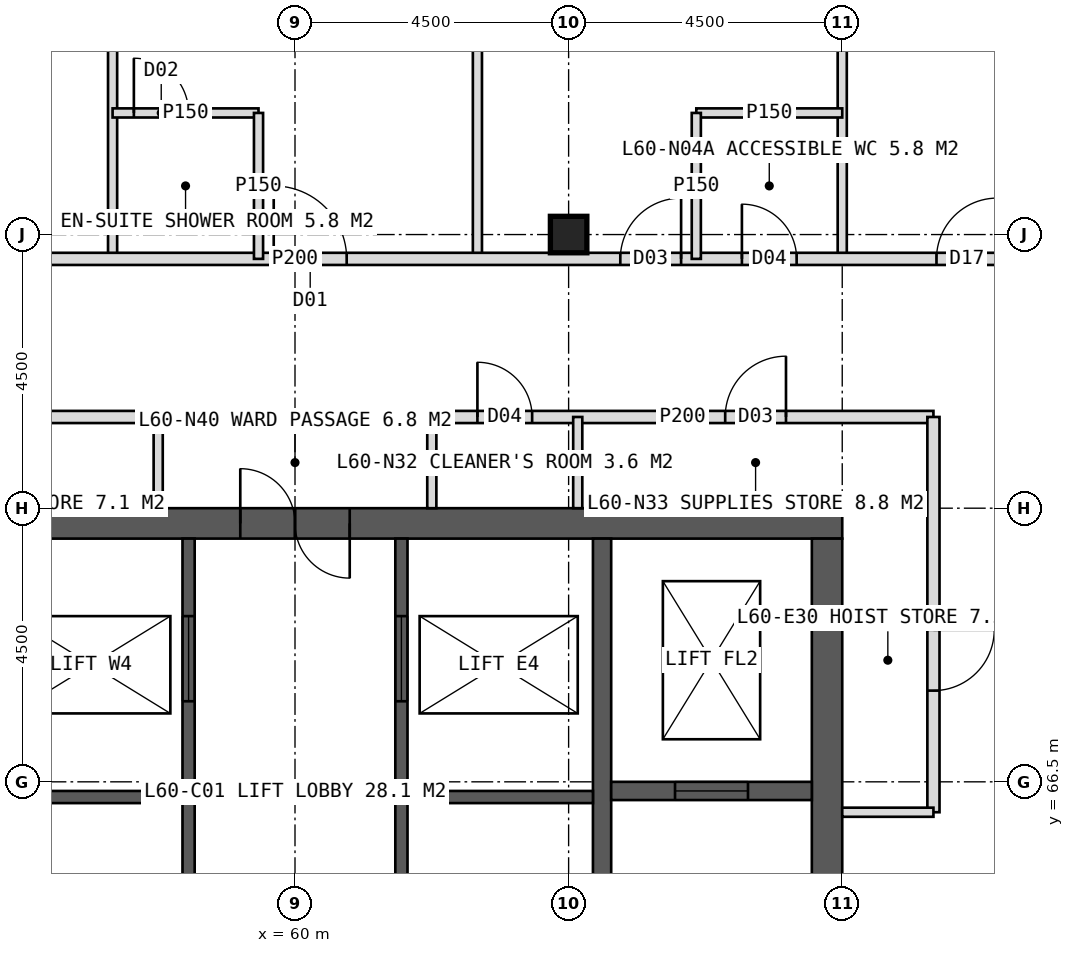
"""IFC4 building model, lengths in metres.
Left out: names, types, materials, properties, quantities, classifications, styles, units other than length and angle.
Written with IfcOpenShell. Run it as: python <this file> out.ifc"""

import sys

from ifc_helpers import new_model, si_unit, direction, frame, frame_2d, origin, origin_2d, place, context, subcontext, project, spatial, rectangle, hollow_rectangle, extrude, element, fill, save


model = new_model("IFC4")
c1 = context("Model", 3, precision=1e-05, world=origin(), true_north=direction((0.0, 1.0)))
c2 = subcontext(c1, "Body", "Model", "MODEL_VIEW")
j1 = project(units=[si_unit("LENGTHUNIT", "METRE"), si_unit("PLANEANGLEUNIT", "RADIAN")], contexts=[c1])
p1 = place(None, origin())
s1 = spatial("IfcSite", under=j1, at=p1, CompositionType="ELEMENT")
p2 = place(p1, origin())
s2 = spatial("IfcBuilding", under=s1, at=p2, CompositionType="ELEMENT")
p3 = place(p2, frame((0.0, 0.0, 250.0)))
s3 = spatial("IfcBuildingStorey", under=s2, at=p3, CompositionType="ELEMENT", Elevation=250.0)
p4 = place(p3, frame((51.0, 70.75, 0.0), z_axis=(0.0, 0.0, 1.0), x_axis=(1.0, 0.0, 0.0)))
e1 = element("IfcWall", 1, at=p4, inside=s3, PredefinedType="SHEAR", context=c2, shape_type="SweptSolid", body=[
    extrude(rectangle(XDim=18.0, YDim=0.5, at=frame_2d((9.0, 0.0))), origin(), (0.0, 0.0, 1.0), 4.0),
])
p5 = place(p4, frame((8.1, 0.0, 0.0)))
e2 = element("IfcOpeningElement", 2, at=p5, cuts=e1, PredefinedType="OPENING", context=c2, shape_type="SweptSolid", body=[
    extrude(rectangle(XDim=1.8, YDim=2.2, at=frame_2d((0.9, 1.1))), frame((0.0, 0.26, 0.0), z_axis=(0.0, -1.0, 0.0), x_axis=(1.0, 0.0, 0.0)), (0.0, 0.0, 1.0), 0.52),
])
p6 = place(p3, frame((68.75, 53.5, 0.0), z_axis=(0.0, 0.0, 1.0), x_axis=(0.0, 1.0, 0.0)))
e3 = element("IfcWall", 3, at=p6, inside=s3, PredefinedType="SHEAR", context=c2, shape_type="SweptSolid", body=[
    extrude(rectangle(XDim=17.0, YDim=0.5, at=frame_2d((8.5, 0.0))), origin(), (0.0, 0.0, 1.0), 4.0),
])
p7 = place(p6, frame((9.6, 0.0, 0.0)))
e4 = element("IfcOpeningElement", 4, at=p7, cuts=e3, PredefinedType="OPENING", context=c2, shape_type="SweptSolid", body=[
    extrude(rectangle(XDim=1.5, YDim=2.2, at=frame_2d((0.75, 1.1))), frame((0.0, 0.26, 0.0), z_axis=(0.0, -1.0, 0.0), x_axis=(1.0, 0.0, 0.0)), (0.0, 0.0, 1.0), 0.52),
])
p8 = place(p3, frame((65.05, 53.5, 0.0), z_axis=(0.0, 0.0, 1.0), x_axis=(0.0, 1.0, 0.0)))
e5 = element("IfcWall", 5, at=p8, inside=s3, PredefinedType="SHEAR", context=c2, shape_type="SweptSolid", body=[
    extrude(rectangle(XDim=17.0, YDim=0.3, at=frame_2d((8.5, 0.0))), origin(), (0.0, 0.0, 1.0), 4.0),
])
p9 = place(p3, frame((58.25, 53.5, 0.0), z_axis=(0.0, 0.0, 1.0), x_axis=(0.0, 1.0, 0.0)))
e6 = element("IfcWall", 6, at=p9, inside=s3, PredefinedType="SHEAR", context=c2, shape_type="SweptSolid", body=[
    extrude(rectangle(XDim=17.0, YDim=0.2, at=frame_2d((8.5, 0.0))), origin(), (0.0, 0.0, 1.0), 4.0),
])
p10 = place(p9, frame((0.393, 0.0, 0.0)))
e7 = element("IfcOpeningElement", 7, at=p10, cuts=e6, PredefinedType="OPENING", context=c2, shape_type="SweptSolid", body=[
    extrude(rectangle(XDim=1.0, YDim=2.1, at=frame_2d((0.5, 1.05))), frame((0.0, 0.11, 0.0), z_axis=(0.0, -1.0, 0.0), x_axis=(1.0, 0.0, 0.0)), (0.0, 0.0, 1.0), 0.22),
])
p11 = place(p9, frame((2.542, 0.0, 0.0)))
e8 = element("IfcOpeningElement", 8, at=p11, cuts=e6, PredefinedType="OPENING", context=c2, shape_type="SweptSolid", body=[
    extrude(rectangle(XDim=1.0, YDim=2.1, at=frame_2d((0.5, 1.05))), frame((0.0, 0.11, 0.0), z_axis=(0.0, -1.0, 0.0), x_axis=(1.0, 0.0, 0.0)), (0.0, 0.0, 1.0), 0.22),
])
p12 = place(p9, frame((5.127, 0.0, 0.0)))
e9 = element("IfcOpeningElement", 9, at=p12, cuts=e6, PredefinedType="OPENING", context=c2, shape_type="SweptSolid", body=[
    extrude(rectangle(XDim=1.0, YDim=2.1, at=frame_2d((0.5, 1.05))), frame((0.0, 0.11, 0.0), z_axis=(0.0, -1.0, 0.0), x_axis=(1.0, 0.0, 0.0)), (0.0, 0.0, 1.0), 0.22),
])
p13 = place(p9, frame((7.228, 0.0, 0.0)))
e10 = element("IfcOpeningElement", 10, at=p13, cuts=e6, PredefinedType="OPENING", context=c2, shape_type="SweptSolid", body=[
    extrude(rectangle(XDim=1.0, YDim=2.1, at=frame_2d((0.5, 1.05))), frame((0.0, 0.11, 0.0), z_axis=(0.0, -1.0, 0.0), x_axis=(1.0, 0.0, 0.0)), (0.0, 0.0, 1.0), 0.22),
])
p14 = place(p9, frame((10.025, 0.0, 0.0)))
e11 = element("IfcOpeningElement", 11, at=p14, cuts=e6, PredefinedType="OPENING", context=c2, shape_type="SweptSolid", body=[
    extrude(rectangle(XDim=1.4, YDim=2.2, at=frame_2d((0.7, 1.1))), frame((0.0, 0.11, 0.0), z_axis=(0.0, -1.0, 0.0), x_axis=(1.0, 0.0, 0.0)), (0.0, 0.0, 1.0), 0.22),
])
p15 = place(p9, frame((14.325, 0.0, 0.0)))
e12 = element("IfcOpeningElement", 12, at=p15, cuts=e6, PredefinedType="OPENING", context=c2, shape_type="SweptSolid", body=[
    extrude(rectangle(XDim=1.4, YDim=2.2, at=frame_2d((0.7, 1.1))), frame((0.0, 0.11, 0.0), z_axis=(0.0, -1.0, 0.0), x_axis=(1.0, 0.0, 0.0)), (0.0, 0.0, 1.0), 0.22),
])
p16 = place(p3, frame((61.75, 53.5, 0.0), z_axis=(0.0, 0.0, 1.0), x_axis=(0.0, 1.0, 0.0)))
e13 = element("IfcWall", 13, at=p16, inside=s3, PredefinedType="SHEAR", context=c2, shape_type="SweptSolid", body=[
    extrude(rectangle(XDim=17.0, YDim=0.2, at=frame_2d((8.5, 0.0))), origin(), (0.0, 0.0, 1.0), 4.0),
])
p17 = place(p16, frame((0.6, 0.0, 0.0)))
e14 = element("IfcOpeningElement", 14, at=p17, cuts=e13, PredefinedType="OPENING", context=c2, shape_type="SweptSolid", body=[
    extrude(rectangle(XDim=1.0, YDim=2.1, at=frame_2d((0.5, 1.05))), frame((0.0, 0.11, 0.0), z_axis=(0.0, -1.0, 0.0), x_axis=(1.0, 0.0, 0.0)), (0.0, 0.0, 1.0), 0.22),
])
p18 = place(p16, frame((2.75, 0.0, 0.0)))
e15 = element("IfcOpeningElement", 15, at=p18, cuts=e13, PredefinedType="OPENING", context=c2, shape_type="SweptSolid", body=[
    extrude(rectangle(XDim=1.0, YDim=2.1, at=frame_2d((0.5, 1.05))), frame((0.0, 0.11, 0.0), z_axis=(0.0, -1.0, 0.0), x_axis=(1.0, 0.0, 0.0)), (0.0, 0.0, 1.0), 0.22),
])
p19 = place(p16, frame((4.824, 0.0, 0.0)))
e16 = element("IfcOpeningElement", 16, at=p19, cuts=e13, PredefinedType="OPENING", context=c2, shape_type="SweptSolid", body=[
    extrude(rectangle(XDim=1.0, YDim=2.1, at=frame_2d((0.5, 1.05))), frame((0.0, 0.11, 0.0), z_axis=(0.0, -1.0, 0.0), x_axis=(1.0, 0.0, 0.0)), (0.0, 0.0, 1.0), 0.22),
])
p20 = place(p16, frame((6.924, 0.0, 0.0)))
e17 = element("IfcOpeningElement", 17, at=p20, cuts=e13, PredefinedType="OPENING", context=c2, shape_type="SweptSolid", body=[
    extrude(rectangle(XDim=1.0, YDim=2.1, at=frame_2d((0.5, 1.05))), frame((0.0, 0.11, 0.0), z_axis=(0.0, -1.0, 0.0), x_axis=(1.0, 0.0, 0.0)), (0.0, 0.0, 1.0), 0.22),
])
p21 = place(p16, frame((10.025, 0.0, 0.0)))
e18 = element("IfcOpeningElement", 18, at=p21, cuts=e13, PredefinedType="OPENING", context=c2, shape_type="SweptSolid", body=[
    extrude(rectangle(XDim=1.4, YDim=2.2, at=frame_2d((0.7, 1.1))), frame((0.0, 0.11, 0.0), z_axis=(0.0, -1.0, 0.0), x_axis=(1.0, 0.0, 0.0)), (0.0, 0.0, 1.0), 0.22),
])
p22 = place(p16, frame((14.325, 0.0, 0.0)))
e19 = element("IfcOpeningElement", 19, at=p22, cuts=e13, PredefinedType="OPENING", context=c2, shape_type="SweptSolid", body=[
    extrude(rectangle(XDim=1.4, YDim=2.2, at=frame_2d((0.7, 1.1))), frame((0.0, 0.11, 0.0), z_axis=(0.0, -1.0, 0.0), x_axis=(1.0, 0.0, 0.0)), (0.0, 0.0, 1.0), 0.22),
])
for number, where, z_axis, x_axis in (
    (20, (55.1, 66.25, 0.0), (0.0, 0.0, 1.0), (1.0, 0.0, 0.0)),
    (21, (61.85, 66.25, 0.0), (0.0, 0.0, 1.0), (1.0, 0.0, 0.0)),
):
    element("IfcWall", number, at=place(p3, frame(where, z_axis=z_axis, x_axis=x_axis)), inside=s3, PredefinedType="SHEAR", context=c2, shape_type="SweptSolid", body=[
        extrude(rectangle(XDim=3.05, YDim=0.2, at=frame_2d((1.525, 0.0))), origin(), (0.0, 0.0, 1.0), 4.0),
    ])
p23 = place(p3, frame((65.2, 66.35, 0.0), z_axis=(0.0, 0.0, 1.0), x_axis=(1.0, 0.0, 0.0)))
e22 = element("IfcWall", 22, at=p23, inside=s3, PredefinedType="SHEAR", context=c2, shape_type="SweptSolid", body=[
    extrude(rectangle(XDim=3.3, YDim=0.3, at=frame_2d((1.65, 0.0))), origin(), (0.0, 0.0, 1.0), 4.0),
])
p24 = place(p23, frame((1.05, 0.0, 0.0)))
e23 = element("IfcOpeningElement", 23, at=p24, cuts=e22, PredefinedType="OPENING", context=c2, shape_type="SweptSolid", body=[
    extrude(rectangle(XDim=1.2, YDim=2.2, at=frame_2d((0.6, 1.1))), frame((0.0, 0.16, 0.0), z_axis=(0.0, -1.0, 0.0), x_axis=(1.0, 0.0, 0.0)), (0.0, 0.0, 1.0), 0.32),
])
p25 = place(p3, frame((64.5, 75.5, 0.0), z_axis=(0.0, 0.0, 1.0), x_axis=(1.0, 0.0, 0.0)))
e24 = element("IfcColumn", 24, at=p25, inside=s3, PredefinedType="COLUMN", context=c2, shape_type="SweptSolid", body=[
    extrude(hollow_rectangle(XDim=0.6, YDim=0.6, WallThickness=0.04, at=origin_2d()), origin(), (0.0, 0.0, 1.0), 4.0),
])
for number, where, z_axis, x_axis in (
    (25, (57.0, 75.1, 0.0), (0.0, 0.0, 1.0), (0.0, 1.0, 0.0)),
    (26, (63.0, 75.1, 0.0), (0.0, 0.0, 1.0), (0.0, 1.0, 0.0)),
    (27, (69.0, 75.1, 0.0), (0.0, 0.0, 1.0), (0.0, 1.0, 0.0)),
):
    element("IfcWall", number, at=place(p3, frame(where, z_axis=z_axis, x_axis=x_axis)), inside=s3, PredefinedType="PARTITIONING", context=c2, shape_type="SweptSolid", body=[
        extrude(rectangle(XDim=7.8, YDim=0.15, at=frame_2d((3.9, 0.0))), origin(), (0.0, 0.0, 1.0), 3.75),
    ])
p26 = place(p3, frame((46.9, 75.1, 0.0), z_axis=(0.0, 0.0, 1.0), x_axis=(1.0, 0.0, 0.0)))
e28 = element("IfcWall", 28, at=p26, inside=s3, PredefinedType="PARTITIONING", context=c2, shape_type="SweptSolid", body=[
    extrude(rectangle(XDim=26.2, YDim=0.2, at=frame_2d((13.1, 0.0))), origin(), (0.0, 0.0, 1.0), 3.75),
])
p27 = place(p26, frame((1.75, 0.0, 0.0)))
e29 = element("IfcOpeningElement", 29, at=p27, cuts=e28, PredefinedType="OPENING", context=c2, shape_type="SweptSolid", body=[
    extrude(rectangle(XDim=1.2, YDim=2.2, at=frame_2d((0.6, 1.1))), frame((0.0, 0.11, 0.0), z_axis=(0.0, -1.0, 0.0), x_axis=(1.0, 0.0, 0.0)), (0.0, 0.0, 1.0), 0.22),
])
p28 = place(p26, frame((6.75, 0.0, 0.0)))
e30 = element("IfcOpeningElement", 30, at=p28, cuts=e28, PredefinedType="OPENING", context=c2, shape_type="SweptSolid", body=[
    extrude(rectangle(XDim=1.0, YDim=2.1, at=frame_2d((0.5, 1.05))), frame((0.0, 0.11, 0.0), z_axis=(0.0, -1.0, 0.0), x_axis=(1.0, 0.0, 0.0)), (0.0, 0.0, 1.0), 0.22),
])
p29 = place(p26, frame((12.75, 0.0, 0.0)))
e31 = element("IfcOpeningElement", 31, at=p29, cuts=e28, PredefinedType="OPENING", context=c2, shape_type="SweptSolid", body=[
    extrude(rectangle(XDim=1.2, YDim=2.2, at=frame_2d((0.6, 1.1))), frame((0.0, 0.11, 0.0), z_axis=(0.0, -1.0, 0.0), x_axis=(1.0, 0.0, 0.0)), (0.0, 0.0, 1.0), 0.22),
])
p30 = place(p26, frame((20.45, 0.0, 0.0)))
e32 = element("IfcOpeningElement", 32, at=p30, cuts=e28, PredefinedType="OPENING", context=c2, shape_type="SweptSolid", body=[
    extrude(rectangle(XDim=0.9, YDim=2.1, at=frame_2d((0.45, 1.05))), frame((0.0, 0.11, 0.0), z_axis=(0.0, -1.0, 0.0), x_axis=(1.0, 0.0, 0.0)), (0.0, 0.0, 1.0), 0.22),
])
p31 = place(p26, frame((18.45, 0.0, 0.0)))
e33 = element("IfcOpeningElement", 33, at=p31, cuts=e28, PredefinedType="OPENING", context=c2, shape_type="SweptSolid", body=[
    extrude(rectangle(XDim=1.0, YDim=2.1, at=frame_2d((0.5, 1.05))), frame((0.0, 0.11, 0.0), z_axis=(0.0, -1.0, 0.0), x_axis=(1.0, 0.0, 0.0)), (0.0, 0.0, 1.0), 0.22),
])
p32 = place(p26, frame((23.65, 0.0, 0.0)))
e34 = element("IfcOpeningElement", 34, at=p32, cuts=e28, PredefinedType="OPENING", context=c2, shape_type="SweptSolid", body=[
    extrude(rectangle(XDim=1.0, YDim=2.1, at=frame_2d((0.5, 1.05))), frame((0.0, 0.11, 0.0), z_axis=(0.0, -1.0, 0.0), x_axis=(1.0, 0.0, 0.0)), (0.0, 0.0, 1.0), 0.22),
])
p33 = place(p3, frame((57.0, 77.5, 0.0), z_axis=(0.0, 0.0, 1.0), x_axis=(1.0, 0.0, 0.0)))
e35 = element("IfcWall", 35, at=p33, inside=s3, PredefinedType="PARTITIONING", context=c2, shape_type="SweptSolid", body=[
    extrude(rectangle(XDim=2.4, YDim=0.15, at=frame_2d((1.2, 0.0))), origin(), (0.0, 0.0, 1.0), 3.75),
])
p34 = place(p33, frame((0.35, 0.0, 0.0)))
e36 = element("IfcOpeningElement", 36, at=p34, cuts=e35, PredefinedType="OPENING", context=c2, shape_type="SweptSolid", body=[
    extrude(rectangle(XDim=0.9, YDim=2.1, at=frame_2d((0.45, 1.05))), frame((0.0, 0.085, 0.0), z_axis=(0.0, -1.0, 0.0), x_axis=(1.0, 0.0, 0.0)), (0.0, 0.0, 1.0), 0.17),
])
for number, where, z_axis, x_axis in (
    (37, (59.4, 75.1, 0.0), (0.0, 0.0, 1.0), (0.0, 1.0, 0.0)),
    (38, (66.6, 77.5, 0.0), (0.0, 0.0, 1.0), (1.0, 0.0, 0.0)),
    (39, (66.6, 75.1, 0.0), (0.0, 0.0, 1.0), (0.0, 1.0, 0.0)),
):
    element("IfcWall", number, at=place(p3, frame(where, z_axis=z_axis, x_axis=x_axis)), inside=s3, PredefinedType="PARTITIONING", context=c2, shape_type="SweptSolid", body=[
        extrude(rectangle(XDim=2.4, YDim=0.15, at=frame_2d((1.2, 0.0))), origin(), (0.0, 0.0, 1.0), 3.75),
    ])
p35 = place(p3, frame((49.5, 72.5, 0.0), z_axis=(0.0, 0.0, 1.0), x_axis=(1.0, 0.0, 0.0)))
e40 = element("IfcWall", 40, at=p35, inside=s3, PredefinedType="PARTITIONING", context=c2, shape_type="SweptSolid", body=[
    extrude(rectangle(XDim=8.25, YDim=0.2, at=frame_2d((4.125, 0.0))), origin(), (0.0, 0.0, 1.0), 3.75),
])
p36 = place(p35, frame((2.05, 0.0, 0.0)))
e41 = element("IfcOpeningElement", 41, at=p36, cuts=e40, PredefinedType="OPENING", context=c2, shape_type="SweptSolid", body=[
    extrude(rectangle(XDim=0.9, YDim=2.1, at=frame_2d((0.45, 1.05))), frame((0.0, 0.11, 0.0), z_axis=(0.0, -1.0, 0.0), x_axis=(1.0, 0.0, 0.0)), (0.0, 0.0, 1.0), 0.22),
])
p37 = place(p35, frame((5.375, 0.0, 0.0)))
e42 = element("IfcOpeningElement", 42, at=p37, cuts=e40, PredefinedType="OPENING", context=c2, shape_type="SweptSolid", body=[
    extrude(rectangle(XDim=1.0, YDim=2.1, at=frame_2d((0.5, 1.05))), frame((0.0, 0.11, 0.0), z_axis=(0.0, -1.0, 0.0), x_axis=(1.0, 0.0, 0.0)), (0.0, 0.0, 1.0), 0.22),
])
p38 = place(p3, frame((62.25, 72.5, 0.0), z_axis=(0.0, 0.0, 1.0), x_axis=(1.0, 0.0, 0.0)))
e43 = element("IfcWall", 43, at=p38, inside=s3, PredefinedType="PARTITIONING", context=c2, shape_type="SweptSolid", body=[
    extrude(rectangle(XDim=8.25, YDim=0.2, at=frame_2d((4.125, 0.0))), origin(), (0.0, 0.0, 1.0), 3.75),
])
p39 = place(p38, frame((0.75, 0.0, 0.0)))
e44 = element("IfcOpeningElement", 44, at=p39, cuts=e43, PredefinedType="OPENING", context=c2, shape_type="SweptSolid", body=[
    extrude(rectangle(XDim=0.9, YDim=2.1, at=frame_2d((0.45, 1.05))), frame((0.0, 0.11, 0.0), z_axis=(0.0, -1.0, 0.0), x_axis=(1.0, 0.0, 0.0)), (0.0, 0.0, 1.0), 0.22),
])
p40 = place(p38, frame((4.825, 0.0, 0.0)))
e45 = element("IfcOpeningElement", 45, at=p40, cuts=e43, PredefinedType="OPENING", context=c2, shape_type="SweptSolid", body=[
    extrude(rectangle(XDim=1.0, YDim=2.1, at=frame_2d((0.5, 1.05))), frame((0.0, 0.11, 0.0), z_axis=(0.0, -1.0, 0.0), x_axis=(1.0, 0.0, 0.0)), (0.0, 0.0, 1.0), 0.22),
])
for number, where, z_axis, x_axis in (
    (46, (57.75, 71.0, 0.0), (0.0, 0.0, 1.0), (0.0, 1.0, 0.0)),
    (47, (62.25, 71.0, 0.0), (0.0, 0.0, 1.0), (0.0, 1.0, 0.0)),
):
    element("IfcWall", number, at=place(p3, frame(where, z_axis=z_axis, x_axis=x_axis)), inside=s3, PredefinedType="PARTITIONING", context=c2, shape_type="SweptSolid", body=[
        extrude(rectangle(XDim=1.5, YDim=0.15, at=frame_2d((0.75, 0.0))), origin(), (0.0, 0.0, 1.0), 3.75),
    ])
p41 = place(p3, frame((64.65, 71.0, 0.0), z_axis=(0.0, 0.0, 1.0), x_axis=(0.0, 1.0, 0.0)))
e48 = element("IfcWall", 48, at=p41, inside=s3, PredefinedType="PARTITIONING", context=c2, shape_type="SweptSolid", body=[
    extrude(rectangle(XDim=1.5, YDim=0.15, at=frame_2d((0.75, 0.0))), origin(), (0.0, 0.0, 1.0), 2.95),
])
p42 = place(p3, frame((69.0, 71.0, 0.0), z_axis=(0.0, 0.0, 1.0), x_axis=(1.0, 0.0, 0.0)))
e49 = element("IfcWall", 49, at=p42, inside=s3, PredefinedType="PARTITIONING", context=c2, shape_type="SweptSolid", body=[
    extrude(rectangle(XDim=1.5, YDim=0.15, at=frame_2d((0.75, 0.0))), origin(), (0.0, 0.0, 1.0), 3.75),
])
p43 = place(p3, frame((70.5, 72.5, 0.0), z_axis=(0.0, 0.0, 1.0), x_axis=(0.0, -1.0, 0.0)))
e50 = element("IfcWall", 50, at=p43, inside=s3, PredefinedType="PARTITIONING", context=c2, shape_type="SweptSolid", body=[
    extrude(rectangle(XDim=6.5, YDim=0.2, at=frame_2d((3.25, 0.0))), origin(), (0.0, 0.0, 1.0), 3.75),
])
p44 = place(p43, frame((3.5, 0.0, 0.0)))
e51 = element("IfcOpeningElement", 51, at=p44, cuts=e50, PredefinedType="OPENING", context=c2, shape_type="SweptSolid", body=[
    extrude(rectangle(XDim=1.0, YDim=2.1, at=frame_2d((0.5, 1.05))), frame((0.0, 0.11, 0.0), z_axis=(0.0, -1.0, 0.0), x_axis=(1.0, 0.0, 0.0)), (0.0, 0.0, 1.0), 0.22),
])
p45 = place(p3, frame((69.0, 66.0, 0.0), z_axis=(0.0, 0.0, 1.0), x_axis=(1.0, 0.0, 0.0)))
e52 = element("IfcWall", 52, at=p45, inside=s3, PredefinedType="PARTITIONING", context=c2, shape_type="SweptSolid", body=[
    extrude(rectangle(XDim=1.5, YDim=0.15, at=frame_2d((0.75, 0.0))), origin(), (0.0, 0.0, 1.0), 3.75),
])
p46 = place(p29, origin())
e53 = element("IfcDoor", 53, at=p46, inside=s3, OperationType="SINGLE_SWING_LEFT", PredefinedType="DOOR", context=c2, shape_type="SweptSolid", body=[
    extrude(rectangle(XDim=1.2, YDim=2.2, at=frame_2d((0.6, 1.1))), frame((0.0, 0.025, 0.0), z_axis=(0.0, -1.0, 0.0), x_axis=(1.0, 0.0, 0.0)), (0.0, 0.0, 1.0), 0.05),
])
fill(e31, e53)
p47 = place(p34, origin())
e54 = element("IfcDoor", 54, at=p47, inside=s3, OperationType="SINGLE_SWING_LEFT", PredefinedType="DOOR", context=c2, shape_type="SweptSolid", body=[
    extrude(rectangle(XDim=0.9, YDim=2.1, at=frame_2d((0.45, 1.05))), frame((0.0, 0.025, 0.0), z_axis=(0.0, -1.0, 0.0), x_axis=(1.0, 0.0, 0.0)), (0.0, 0.0, 1.0), 0.05),
])
fill(e36, e54)
p48 = place(p30, origin())
e55 = element("IfcDoor", 55, at=p48, inside=s3, OperationType="SINGLE_SWING_LEFT", PredefinedType="DOOR", context=c2, shape_type="SweptSolid", body=[
    extrude(rectangle(XDim=0.9, YDim=2.1, at=frame_2d((0.45, 1.05))), frame((0.0, 0.025, 0.0), z_axis=(0.0, -1.0, 0.0), x_axis=(1.0, 0.0, 0.0)), (0.0, 0.0, 1.0), 0.05),
])
fill(e32, e55)
p49 = place(p31, origin())
e56 = element("IfcDoor", 56, at=p49, inside=s3, OperationType="SINGLE_SWING_RIGHT", PredefinedType="DOOR", context=c2, shape_type="SweptSolid", body=[
    extrude(rectangle(XDim=1.0, YDim=2.1, at=frame_2d((0.5, 1.05))), frame((0.0, 0.025, 0.0), z_axis=(0.0, -1.0, 0.0), x_axis=(1.0, 0.0, 0.0)), (0.0, 0.0, 1.0), 0.05),
])
fill(e33, e56)
p50 = place(p32, origin())
e57 = element("IfcDoor", 57, at=p50, inside=s3, OperationType="SINGLE_SWING_RIGHT", PredefinedType="DOOR", context=c2, shape_type="SweptSolid", body=[
    extrude(rectangle(XDim=1.0, YDim=2.1, at=frame_2d((0.5, 1.05))), frame((0.0, 0.025, 0.0), z_axis=(0.0, -1.0, 0.0), x_axis=(1.0, 0.0, 0.0)), (0.0, 0.0, 1.0), 0.05),
])
fill(e34, e57)
p51 = place(p39, origin())
e58 = element("IfcDoor", 58, at=p51, inside=s3, OperationType="SINGLE_SWING_LEFT", PredefinedType="DOOR", context=c2, shape_type="SweptSolid", body=[
    extrude(rectangle(XDim=0.9, YDim=2.1, at=frame_2d((0.45, 1.05))), frame((0.0, 0.025, 0.0), z_axis=(0.0, -1.0, 0.0), x_axis=(1.0, 0.0, 0.0)), (0.0, 0.0, 1.0), 0.05),
])
fill(e44, e58)
p52 = place(p40, origin())
e59 = element("IfcDoor", 59, at=p52, inside=s3, OperationType="SINGLE_SWING_RIGHT", PredefinedType="DOOR", context=c2, shape_type="SweptSolid", body=[
    extrude(rectangle(XDim=1.0, YDim=2.1, at=frame_2d((0.5, 1.05))), frame((0.0, 0.025, 0.0), z_axis=(0.0, -1.0, 0.0), x_axis=(1.0, 0.0, 0.0)), (0.0, 0.0, 1.0), 0.05),
])
fill(e45, e59)
p53 = place(p44, origin())
e60 = element("IfcDoor", 60, at=p53, inside=s3, OperationType="SINGLE_SWING_LEFT", PredefinedType="DOOR", context=c2, shape_type="SweptSolid", body=[
    extrude(rectangle(XDim=1.0, YDim=2.1, at=frame_2d((0.5, 1.05))), frame((0.0, 0.025, 0.0), z_axis=(0.0, -1.0, 0.0), x_axis=(1.0, 0.0, 0.0)), (0.0, 0.0, 1.0), 0.05),
])
fill(e51, e60)
p54 = place(p5, origin())
e61 = element("IfcDoor", 61, at=p54, inside=s3, OperationType="DOUBLE_DOOR_SINGLE_SWING", PredefinedType="DOOR", context=c2, shape_type="SweptSolid", body=[
    extrude(rectangle(XDim=1.8, YDim=2.2, at=frame_2d((0.9, 1.1))), frame((0.0, 0.025, 0.0), z_axis=(0.0, -1.0, 0.0), x_axis=(1.0, 0.0, 0.0)), (0.0, 0.0, 1.0), 0.05),
])
fill(e2, e61)
p55 = place(p24, origin())
e62 = element("IfcDoor", 62, at=p55, inside=s3, OperationType="SLIDING_TO_LEFT", PredefinedType="DOOR", context=c2, shape_type="SweptSolid", body=[
    extrude(rectangle(XDim=1.2, YDim=2.2, at=frame_2d((0.6, 1.1))), frame((0.0, 0.025, 0.0), z_axis=(0.0, -1.0, 0.0), x_axis=(1.0, 0.0, 0.0)), (0.0, 0.0, 1.0), 0.05),
])
fill(e23, e62)
p56 = place(p15, origin())
e63 = element("IfcDoor", 63, at=p56, inside=s3, OperationType="SLIDING_TO_LEFT", PredefinedType="DOOR", context=c2, shape_type="SweptSolid", body=[
    extrude(rectangle(XDim=1.4, YDim=2.2, at=frame_2d((0.7, 1.1))), frame((0.0, 0.025, 0.0), z_axis=(0.0, -1.0, 0.0), x_axis=(1.0, 0.0, 0.0)), (0.0, 0.0, 1.0), 0.05),
])
fill(e12, e63)
p57 = place(p22, origin())
e64 = element("IfcDoor", 64, at=p57, inside=s3, OperationType="SLIDING_TO_LEFT", PredefinedType="DOOR", context=c2, shape_type="SweptSolid", body=[
    extrude(rectangle(XDim=1.4, YDim=2.2, at=frame_2d((0.7, 1.1))), frame((0.0, 0.025, 0.0), z_axis=(0.0, -1.0, 0.0), x_axis=(1.0, 0.0, 0.0)), (0.0, 0.0, 1.0), 0.05),
])
fill(e19, e64)
save(model, sys.argv[1])
